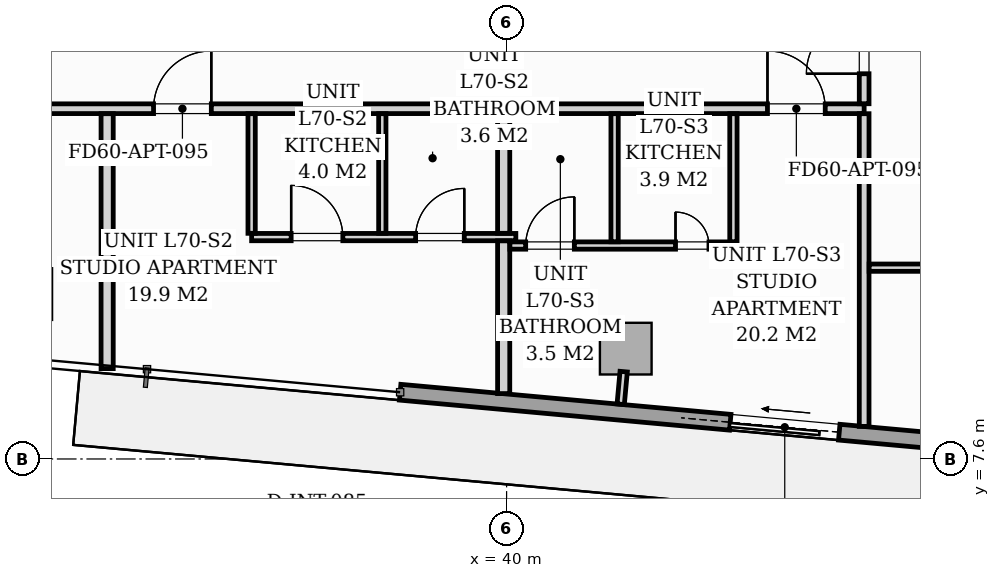
"""IFC4 building model, lengths in metres.
Left out: names, types, materials, properties, quantities, classifications, styles, units other than length and angle.
Written with IfcOpenShell. Run it as: python <this file> out.ifc"""

import sys

from ifc_helpers import new_model, si_unit, direction, frame, frame_2d, origin, origin_2d, place, context, subcontext, project, spatial, rectangle, extrude, source, transform, mapped, element, fill, save


model = new_model("IFC4")
c1 = context("Model", 3, precision=1e-05, world=origin(), true_north=direction((0.0, 1.0)))
c2 = subcontext(c1, "Body", "Model", "MODEL_VIEW")
j1 = project(units=[si_unit("LENGTHUNIT", "METRE"), si_unit("PLANEANGLEUNIT", "RADIAN")], contexts=[c1])
p1 = place(None, origin())
s1 = spatial("IfcSite", under=j1, at=p1, CompositionType="ELEMENT")
p2 = place(p1, origin())
s2 = spatial("IfcBuilding", under=s1, at=p2, CompositionType="ELEMENT")
p3 = place(p2, frame((0.0, 0.0, 243.0)))
s3 = spatial("IfcBuildingStorey", under=s2, at=p3, CompositionType="ELEMENT", Elevation=243.0)
m1 = source(origin(), c2, "Body", "SweptSolid", [
    extrude(rectangle(XDim=0.85, YDim=0.85, at=origin_2d()), origin(), (0.0, 0.0, 1.0), 3.296),
])
for number, where, z_axis, x_axis in (
    (1, (32.1, 10.312, 0.002), (0.0, 0.0, 1.0), (0.996, -0.091, 0.0)),
    (2, (41.96, 9.415, 0.002), (0.0, 0.0, 1.0), (0.996, -0.091, 0.0)),
):
    element("IfcColumn", number, at=place(p3, frame(where, z_axis=z_axis, x_axis=x_axis)), inside=s3, PredefinedType="COLUMN", context=c2, shape_type="MappedRepresentation", body=[
        mapped(m1, transform((0.0, 0.0, 0.0), scale=1.0)),
    ])
p4 = place(p3, frame((52.819, 7.372, 0.0), z_axis=(0.0, 0.0, 1.0), x_axis=(-0.995884447498, 0.090632043071, 0.0)))
e3 = element("IfcWall", 3, at=p4, inside=s3, PredefinedType="STANDARD", context=c2, shape_type="SweptSolid", body=[
    extrude(rectangle(XDim=14.63, YDim=0.26, at=frame_2d((7.315, 0.0))), origin(), (0.0, 0.0, 1.0), 3.04),
])
p5 = place(p4, frame((7.379, 0.0, 0.0)))
e4 = element("IfcOpeningElement", 4, at=p5, cuts=e3, PredefinedType="OPENING", context=c2, shape_type="SweptSolid", body=[
    extrude(rectangle(XDim=1.8, YDim=2.06, at=frame_2d((0.9, 1.03))), frame((0.0, 0.14, 0.0), z_axis=(0.0, -1.0, 0.0), x_axis=(1.0, 0.0, 0.0)), (0.0, 0.0, 1.0), 0.28),
])
p6 = place(p4, frame((2.05, 0.0, 0.65)))
e5 = element("IfcOpeningElement", 5, at=p6, cuts=e3, PredefinedType="OPENING", context=c2, shape_type="SweptSolid", body=[
    extrude(rectangle(XDim=1.6, YDim=1.5, at=frame_2d((0.8, 0.75))), frame((0.0, 0.14, 0.0), z_axis=(0.0, -1.0, 0.0), x_axis=(1.0, 0.0, 0.0)), (0.0, 0.0, 1.0), 0.28),
])
p7 = place(p3, frame((26.12, 13.36, 0.0), z_axis=(0.0, 0.0, 1.0), x_axis=(1.0, 0.0, 0.0)))
e6 = element("IfcWall", 6, at=p7, inside=s3, PredefinedType="PARTITIONING", context=c2, shape_type="SweptSolid", body=[
    extrude(rectangle(XDim=19.76, YDim=0.16, at=frame_2d((9.88, 0.0))), origin(), (0.0, 0.0, 1.0), 2.55),
])
p8 = place(p7, frame((5.221, 0.0, 0.0)))
e7 = element("IfcOpeningElement", 7, at=p8, cuts=e6, PredefinedType="OPENING", context=c2, shape_type="SweptSolid", body=[
    extrude(rectangle(XDim=0.95, YDim=2.06, at=frame_2d((0.475, 1.03))), frame((0.0, 0.09, 0.0), z_axis=(0.0, -1.0, 0.0), x_axis=(1.0, 0.0, 0.0)), (0.0, 0.0, 1.0), 0.18),
])
p9 = place(p7, frame((8.074, 0.0, 0.0)))
e8 = element("IfcOpeningElement", 8, at=p9, cuts=e6, PredefinedType="OPENING", context=c2, shape_type="SweptSolid", body=[
    extrude(rectangle(XDim=0.95, YDim=2.06, at=frame_2d((0.475, 1.03))), frame((0.0, 0.09, 0.0), z_axis=(0.0, -1.0, 0.0), x_axis=(1.0, 0.0, 0.0)), (0.0, 0.0, 1.0), 0.18),
])
p10 = place(p7, frame((18.17, 0.0, 0.0)))
e9 = element("IfcOpeningElement", 9, at=p10, cuts=e6, PredefinedType="OPENING", context=c2, shape_type="SweptSolid", body=[
    extrude(rectangle(XDim=0.95, YDim=2.06, at=frame_2d((0.475, 1.03))), frame((0.0, 0.09, 0.0), z_axis=(0.0, -1.0, 0.0), x_axis=(1.0, 0.0, 0.0)), (0.0, 0.0, 1.0), 0.18),
])
p11 = place(p3, frame((45.88, 8.136, 0.0), z_axis=(0.0, 0.0, 1.0), x_axis=(0.0, 1.0, 0.0)))
e10 = element("IfcWall", 10, at=p11, inside=s3, PredefinedType="PARTITIONING", context=c2, shape_type="SweptSolid", body=[
    extrude(rectangle(XDim=5.142, YDim=0.16, at=frame_2d((2.571, 0.0))), origin(), (0.0, 0.0, 1.0), 3.04),
])
p12 = place(p3, frame((45.88, 13.442, 0.0), z_axis=(0.0, 0.0, 1.0), x_axis=(0.0, 1.0, 0.0)))
e11 = element("IfcWall", 11, at=p12, inside=s3, PredefinedType="PARTITIONING", context=c2, shape_type="SweptSolid", body=[
    extrude(rectangle(XDim=4.36, YDim=0.16, at=frame_2d((2.18, 0.0))), origin(), (0.0, 0.0, 1.0), 3.04),
])
p13 = place(p12, frame((0.493, 0.0, 0.0)))
e12 = element("IfcOpeningElement", 12, at=p13, cuts=e11, PredefinedType="OPENING", context=c2, shape_type="SweptSolid", body=[
    extrude(rectangle(XDim=0.95, YDim=2.06, at=frame_2d((0.475, 1.03))), frame((0.0, 0.09, 0.0), z_axis=(0.0, -1.0, 0.0), x_axis=(1.0, 0.0, 0.0)), (0.0, 0.0, 1.0), 0.18),
])
p14 = place(p3, frame((33.431, 9.086, 0.0), z_axis=(0.0, 0.0, 1.0), x_axis=(0.0, 1.0, 0.0)))
e13 = element("IfcWall", 13, at=p14, inside=s3, PredefinedType="PARTITIONING", context=c2, shape_type="SweptSolid", body=[
    extrude(rectangle(XDim=4.192, YDim=0.2, at=frame_2d((2.096, 0.0))), origin(), (0.0, 0.0, 1.0), 3.04),
])
p15 = place(p3, frame((35.807, 11.249, 0.0), z_axis=(0.0, 0.0, 1.0), x_axis=(1.0, 0.0, 0.0)))
e14 = element("IfcWall", 14, at=p15, inside=s3, PredefinedType="PARTITIONING", context=c2, shape_type="SweptSolid", body=[
    extrude(rectangle(XDim=4.345, YDim=0.12, at=frame_2d((2.173, 0.0))), origin(), (0.0, 0.0, 1.0), 3.04),
])
p16 = place(p15, frame((0.65, 0.0, 0.0)))
e15 = element("IfcOpeningElement", 15, at=p16, cuts=e14, PredefinedType="OPENING", context=c2, shape_type="SweptSolid", body=[
    extrude(rectangle(XDim=0.85, YDim=2.05, at=frame_2d((0.425, 1.025))), frame((0.0, 0.07, 0.0), z_axis=(0.0, -1.0, 0.0), x_axis=(1.0, 0.0, 0.0)), (0.0, 0.0, 1.0), 0.14),
])
p17 = place(p15, frame((2.697, 0.0, 0.0)))
e16 = element("IfcOpeningElement", 16, at=p17, cuts=e14, PredefinedType="OPENING", context=c2, shape_type="SweptSolid", body=[
    extrude(rectangle(XDim=0.8, YDim=2.02, at=frame_2d((0.4, 1.01))), frame((0.0, 0.07, 0.0), z_axis=(0.0, -1.0, 0.0), x_axis=(1.0, 0.0, 0.0)), (0.0, 0.0, 1.0), 0.14),
])
for number, where, z_axis, x_axis in (
    (17, (35.807, 11.311, 0.0), (0.0, 0.0, 1.0), (0.0, 1.0, 0.0)),
    (18, (37.956, 11.311, 0.0), (0.0, 0.0, 1.0), (0.0, 1.0, 0.0)),
):
    element("IfcWall", number, at=place(p3, frame(where, z_axis=z_axis, x_axis=x_axis)), inside=s3, PredefinedType="PARTITIONING", context=c2, shape_type="SweptSolid", body=[
        extrude(rectangle(XDim=1.967, YDim=0.12, at=frame_2d((0.983, 0.0))), origin(), (0.0, 0.0, 1.0), 3.04),
    ])
p18 = place(p3, frame((39.952, 8.675, 0.0), z_axis=(0.0, 0.0, 1.0), x_axis=(0.0, 1.0, 0.0)))
e19 = element("IfcWall", 19, at=p18, inside=s3, PredefinedType="PARTITIONING", context=c2, shape_type="SweptSolid", body=[
    extrude(rectangle(XDim=2.512, YDim=0.2, at=frame_2d((1.256, 0.0))), origin(), (0.0, 0.0, 1.0), 3.04),
])
p19 = place(p3, frame((39.952, 11.311, 0.0), z_axis=(0.0, 0.0, 1.0), x_axis=(0.0, 1.0, 0.0)))
e20 = element("IfcWall", 20, at=p19, inside=s3, PredefinedType="PARTITIONING", context=c2, shape_type="SweptSolid", body=[
    extrude(rectangle(XDim=1.967, YDim=0.2, at=frame_2d((0.983, 0.0))), origin(), (0.0, 0.0, 1.0), 3.04),
])
p20 = place(p3, frame((40.054, 11.11, 0.0), z_axis=(0.0, 0.0, 1.0), x_axis=(1.0, 0.0, 0.0)))
e21 = element("IfcWall", 21, at=p20, inside=s3, PredefinedType="PARTITIONING", context=c2, shape_type="SweptSolid", body=[
    extrude(rectangle(XDim=3.676, YDim=0.12, at=frame_2d((1.838, 0.0))), origin(), (0.0, 0.0, 1.0), 3.04),
])
p21 = place(p20, frame((0.26, 0.0, 0.0)))
e22 = element("IfcOpeningElement", 22, at=p21, cuts=e21, PredefinedType="OPENING", context=c2, shape_type="SweptSolid", body=[
    extrude(rectangle(XDim=0.8, YDim=2.02, at=frame_2d((0.4, 1.01))), frame((0.0, 0.07, 0.0), z_axis=(0.0, -1.0, 0.0), x_axis=(1.0, 0.0, 0.0)), (0.0, 0.0, 1.0), 0.14),
])
p22 = place(p20, frame((2.724, 0.0, 0.0)))
e23 = element("IfcOpeningElement", 23, at=p22, cuts=e21, PredefinedType="OPENING", context=c2, shape_type="SweptSolid", body=[
    extrude(rectangle(XDim=0.55, YDim=2.0, at=frame_2d((0.275, 1.0))), frame((0.0, 0.07, 0.0), z_axis=(0.0, -1.0, 0.0), x_axis=(1.0, 0.0, 0.0)), (0.0, 0.0, 1.0), 0.14),
])
for number, where, z_axis, x_axis in (
    (24, (43.73, 11.172, 0.0), (0.0, 0.0, 1.0), (0.0, 1.0, 0.0)),
    (25, (41.776, 11.172, 0.0), (0.0, 0.0, 1.0), (0.0, 1.0, 0.0)),
):
    element("IfcWall", number, at=place(p3, frame(where, z_axis=z_axis, x_axis=x_axis)), inside=s3, PredefinedType="PARTITIONING", context=c2, shape_type="SweptSolid", body=[
        extrude(rectangle(XDim=2.106, YDim=0.12, at=frame_2d((1.053, 0.0))), origin(), (0.0, 0.0, 1.0), 3.04),
    ])
p23 = place(p3, frame((45.962, 10.746, 0.0), z_axis=(0.0, 0.0, 1.0), x_axis=(1.0, 0.0, 0.0)))
e26 = element("IfcWall", 26, at=p23, inside=s3, PredefinedType="PARTITIONING", context=c2, shape_type="SweptSolid", body=[
    extrude(rectangle(XDim=9.594, YDim=0.12, at=frame_2d((4.797, 0.0))), origin(), (0.0, 0.0, 1.0), 3.04),
])
p24 = place(p23, frame((4.378, 0.0, 0.0)))
e27 = element("IfcOpeningElement", 27, at=p24, cuts=e26, PredefinedType="OPENING", context=c2, shape_type="SweptSolid", body=[
    extrude(rectangle(XDim=0.85, YDim=2.05, at=frame_2d((0.425, 1.025))), frame((0.0, 0.07, 0.0), z_axis=(0.0, -1.0, 0.0), x_axis=(1.0, 0.0, 0.0)), (0.0, 0.0, 1.0), 0.14),
])
p25 = place(p3, frame((41.925, 9.036, 0.0), z_axis=(0.0, 0.0, 1.0), x_axis=(-0.090740281653, -0.995874591144, 0.0)))
e28 = element("IfcWall", 28, at=p25, inside=s3, PredefinedType="PARTITIONING", context=c2, shape_type="SweptSolid", body=[
    extrude(rectangle(XDim=0.538, YDim=0.12, at=frame_2d((0.269, 0.0))), origin(), (0.0, 0.0, 1.0), 3.04),
])
m2 = source(origin(), c2, "Body", "SweptSolid", [
    extrude(rectangle(XDim=1.8, YDim=2.06, at=frame_2d((0.9, 1.03))), frame((0.0, 0.025, 0.0), z_axis=(0.0, -1.0, 0.0), x_axis=(1.0, 0.0, 0.0)), (0.0, 0.0, 1.0), 0.05),
])
p26 = place(p5, origin())
e29 = element("IfcDoor", 29, at=p26, inside=s3, OperationType="SLIDING_TO_RIGHT", PredefinedType="DOOR", context=c2, shape_type="MappedRepresentation", body=[
    mapped(m2, transform((0.0, 0.0, 0.0), scale=1.0)),
])
fill(e4, e29)
m3 = source(origin(), c2, "Body", "SweptSolid", [
    extrude(rectangle(XDim=0.95, YDim=2.06, at=frame_2d((0.475, 1.03))), frame((0.0, 0.025, 0.0), z_axis=(0.0, -1.0, 0.0), x_axis=(1.0, 0.0, 0.0)), (0.0, 0.0, 1.0), 0.05),
])
p27 = place(p9, origin())
e30 = element("IfcDoor", 30, at=p27, inside=s3, OperationType="SINGLE_SWING_RIGHT", PredefinedType="DOOR", context=c2, shape_type="MappedRepresentation", body=[
    mapped(m3, transform((0.0, 0.0, 0.0), scale=1.0)),
])
fill(e8, e30)
m4 = source(origin(), c2, "Body", "SweptSolid", [
    extrude(rectangle(XDim=0.85, YDim=2.05, at=frame_2d((0.425, 1.025))), frame((0.0, 0.025, 0.0), z_axis=(0.0, -1.0, 0.0), x_axis=(1.0, 0.0, 0.0)), (0.0, 0.0, 1.0), 0.05),
])
p28 = place(p16, origin())
e31 = element("IfcDoor", 31, at=p28, inside=s3, OperationType="SINGLE_SWING_LEFT", PredefinedType="DOOR", context=c2, shape_type="MappedRepresentation", body=[
    mapped(m4, transform((0.0, 0.0, 0.0), scale=1.0)),
])
fill(e15, e31)
m5 = source(origin(), c2, "Body", "SweptSolid", [
    extrude(rectangle(XDim=0.8, YDim=2.02, at=frame_2d((0.4, 1.01))), frame((0.0, 0.025, 0.0), z_axis=(0.0, -1.0, 0.0), x_axis=(1.0, 0.0, 0.0)), (0.0, 0.0, 1.0), 0.05),
])
p29 = place(p17, origin())
e32 = element("IfcDoor", 32, at=p29, inside=s3, OperationType="SINGLE_SWING_RIGHT", PredefinedType="DOOR", context=c2, shape_type="MappedRepresentation", body=[
    mapped(m5, transform((0.0, 0.0, 0.0), scale=1.0)),
])
fill(e16, e32)
p30 = place(p10, origin())
e33 = element("IfcDoor", 33, at=p30, inside=s3, OperationType="SINGLE_SWING_LEFT", PredefinedType="DOOR", context=c2, shape_type="MappedRepresentation", body=[
    mapped(m3, transform((0.0, 0.0, 0.0), scale=1.0)),
])
fill(e9, e33)
p31 = place(p21, origin())
e34 = element("IfcDoor", 34, at=p31, inside=s3, OperationType="SINGLE_SWING_RIGHT", PredefinedType="DOOR", context=c2, shape_type="MappedRepresentation", body=[
    mapped(m5, transform((0.0, 0.0, 0.0), scale=1.0)),
])
fill(e22, e34)
m6 = source(origin(), c2, "Body", "SweptSolid", [
    extrude(rectangle(XDim=0.55, YDim=2.0, at=frame_2d((0.275, 1.0))), frame((0.0, 0.025, 0.0), z_axis=(0.0, -1.0, 0.0), x_axis=(1.0, 0.0, 0.0)), (0.0, 0.0, 1.0), 0.05),
])
p32 = place(p22, origin())
e35 = element("IfcDoor", 35, at=p32, inside=s3, OperationType="SINGLE_SWING_LEFT", PredefinedType="DOOR", context=c2, shape_type="MappedRepresentation", body=[
    mapped(m6, transform((0.0, 0.0, 0.0), scale=1.0)),
])
fill(e23, e35)
p33 = place(p13, origin())
e36 = element("IfcDoor", 36, at=p33, inside=s3, OperationType="SINGLE_SWING_LEFT", PredefinedType="DOOR", context=c2, shape_type="MappedRepresentation", body=[
    mapped(m3, transform((0.0, 0.0, 0.0), scale=1.0)),
])
fill(e12, e36)
save(model, sys.argv[1])
